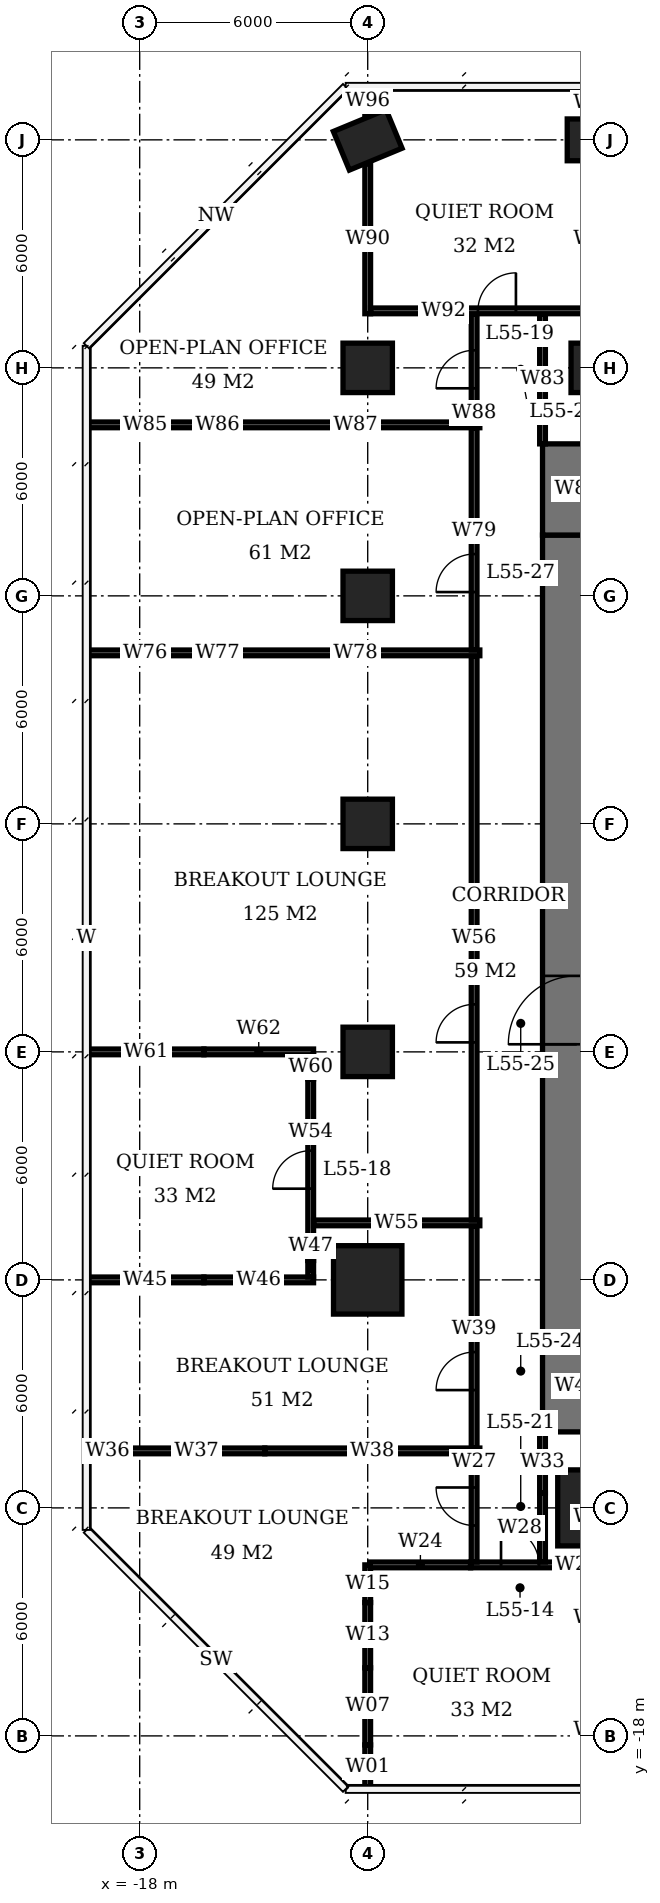
"""IFC4 building model, lengths in metres.
Left out: names, types, materials, properties, quantities, classifications, styles, units other than length and angle.
Written with IfcOpenShell. Run it as: python <this file> out.ifc"""

import sys

from ifc_helpers import new_model, si_unit, direction, frame, frame_2d, origin, origin_2d, place, context, subcontext, project, spatial, rectangle, extrude, element, fill, save


model = new_model("IFC4")
c1 = context("Model", 3, precision=1e-05, world=origin(), true_north=direction((0.0, 1.0)))
c2 = subcontext(c1, "Body", "Model", "MODEL_VIEW")
j1 = project(units=[si_unit("LENGTHUNIT", "METRE"), si_unit("PLANEANGLEUNIT", "RADIAN")], contexts=[c1])
p1 = place(None, origin())
s1 = spatial("IfcSite", under=j1, at=p1, CompositionType="ELEMENT")
p2 = place(p1, origin())
s2 = spatial("IfcBuilding", under=s1, at=p2, CompositionType="ELEMENT")
p3 = place(p2, frame((0.0, 0.0, 224.0)))
s3 = spatial("IfcBuildingStorey", under=s2, at=p3, CompositionType="ELEMENT", Elevation=224.0)
p4 = place(p3, frame((-12.0, -6.0, 0.0), z_axis=(0.0, 0.0, 1.0), x_axis=(1.0, 0.0, 0.0)))
e1 = element("IfcColumn", 1, at=p4, inside=s3, PredefinedType="COLUMN", context=c2, shape_type="SweptSolid", body=[
    extrude(rectangle(XDim=1.8, YDim=1.8, at=origin_2d()), origin(), (0.0, 0.0, 1.0), 3.9),
])
for number, where, z_axis, x_axis in (
    (2, (-12.0, 0.0, 0.0), (0.0, 0.0, 1.0), (1.0, 0.0, 0.0)),
    (3, (-12.0, 6.0, 0.0), (0.0, 0.0, 1.0), (1.0, 0.0, 0.0)),
    (4, (-12.0, 12.0, 0.0), (0.0, 0.0, 1.0), (1.0, 0.0, 0.0)),
    (5, (-12.0, 18.0, 0.0), (0.0, 0.0, 1.0), (1.0, 0.0, 0.0)),
):
    element("IfcColumn", number, at=place(p3, frame(where, z_axis=z_axis, x_axis=x_axis)), inside=s3, PredefinedType="COLUMN", context=c2, shape_type="SweptSolid", body=[
        extrude(rectangle(XDim=1.3, YDim=1.3, at=origin_2d()), origin(), (0.0, 0.0, 1.0), 3.9),
    ])
p5 = place(p3, frame((-12.0, 24.0, 0.0), z_axis=(0.0, 0.0, 1.0), x_axis=(0.923879532511, 0.382683432365, 0.0)))
e6 = element("IfcColumn", 6, at=p5, inside=s3, PredefinedType="COLUMN", context=c2, shape_type="SweptSolid", body=[
    extrude(rectangle(XDim=1.5, YDim=1.1, at=origin_2d()), origin(), (0.0, 0.0, 1.0), 3.9),
])
p6 = place(p3, frame((-6.0, -12.0, 0.0), z_axis=(0.0, 0.0, 1.0), x_axis=(1.0, 0.0, 0.0)))
e7 = element("IfcColumn", 7, at=p6, inside=s3, PredefinedType="COLUMN", context=c2, shape_type="SweptSolid", body=[
    extrude(rectangle(XDim=2.0, YDim=2.0, at=origin_2d()), origin(), (0.0, 0.0, 1.0), 3.9),
])
p7 = place(p3, frame((-6.0, 18.0, 0.0), z_axis=(0.0, 0.0, 1.0), x_axis=(1.0, 0.0, 0.0)))
e8 = element("IfcColumn", 8, at=p7, inside=s3, PredefinedType="COLUMN", context=c2, shape_type="SweptSolid", body=[
    extrude(rectangle(XDim=1.3, YDim=1.3, at=origin_2d()), origin(), (0.0, 0.0, 1.0), 3.9),
])
p8 = place(p3, frame((-6.0, 24.0, 0.0), z_axis=(0.0, 0.0, 1.0), x_axis=(1.0, 0.0, 0.0)))
e9 = element("IfcColumn", 9, at=p8, inside=s3, PredefinedType="COLUMN", context=c2, shape_type="SweptSolid", body=[
    extrude(rectangle(XDim=1.5, YDim=1.1, at=origin_2d()), origin(), (0.0, 0.0, 1.0), 3.9),
])
p9 = place(p3, frame((-6.5, -7.6, 0.0), z_axis=(0.0, 0.0, 1.0), x_axis=(0.0, 1.0, 0.0)))
e10 = element("IfcWall", 10, at=p9, inside=s3, PredefinedType="SHEAR", context=c2, shape_type="SweptSolid", body=[
    extrude(rectangle(XDim=21.2, YDim=1.8, at=frame_2d((10.6, 0.0))), origin(), (0.0, 0.0, 1.0), 3.9),
])
p10 = place(p9, frame((7.8, 0.0, 0.0)))
e11 = element("IfcOpeningElement", 11, at=p10, cuts=e10, PredefinedType="OPENING", context=c2, shape_type="SweptSolid", body=[
    extrude(rectangle(XDim=1.8, YDim=2.4, at=frame_2d((0.9, 1.2))), frame((0.0, 0.91, 0.0), z_axis=(0.0, -1.0, 0.0), x_axis=(1.0, 0.0, 0.0)), (0.0, 0.0, 1.0), 1.82),
])
for number, where, z_axis, x_axis in (
    (12, (-6.5, -10.0, 0.0), (0.0, 0.0, 1.0), (0.0, 1.0, 0.0)),
    (13, (-6.5, 13.6, 0.0), (0.0, 0.0, 1.0), (0.0, 1.0, 0.0)),
):
    element("IfcWall", number, at=place(p3, frame(where, z_axis=z_axis, x_axis=x_axis)), inside=s3, PredefinedType="SHEAR", context=c2, shape_type="SweptSolid", body=[
        extrude(rectangle(XDim=2.4, YDim=1.8, at=frame_2d((1.2, 0.0))), origin(), (0.0, 0.0, 1.0), 3.9),
    ])
p11 = place(p3, frame((-11.935, -13.5, 0.0), z_axis=(0.0, 0.0, 1.0), x_axis=(1.0, 0.0, 0.0)))
e14 = element("IfcWall", 14, at=p11, inside=s3, PredefinedType="PARTITIONING", context=c2, shape_type="SweptSolid", body=[
    extrude(rectangle(XDim=2.643, YDim=0.15, at=frame_2d((1.322, 0.0))), origin(), (0.0, 0.0, 1.0), 3.65),
])
p12 = place(p3, frame((-9.292, -13.5, 0.0), z_axis=(0.0, 0.0, 1.0), x_axis=(1.0, 0.0, 0.0)))
e15 = element("IfcWall", 15, at=p12, inside=s3, PredefinedType="PARTITIONING", context=c2, shape_type="SweptSolid", body=[
    extrude(rectangle(XDim=3.217, YDim=0.15, at=frame_2d((1.608, 0.0))), origin(), (0.0, 0.0, 1.0), 2.65),
])
p13 = place(p12, frame((0.8, 0.0, 0.0)))
e16 = element("IfcOpeningElement", 16, at=p13, cuts=e15, PredefinedType="OPENING", context=c2, shape_type="SweptSolid", body=[
    extrude(rectangle(XDim=1.0, YDim=2.1, at=frame_2d((0.5, 1.05))), frame((0.0, 0.085, 0.0), z_axis=(0.0, -1.0, 0.0), x_axis=(1.0, 0.0, 0.0)), (0.0, 0.0, 1.0), 0.17),
])
p14 = place(p3, frame((-19.4, -6.0, 0.0), z_axis=(0.0, 0.0, 1.0), x_axis=(1.0, 0.0, 0.0)))
e17 = element("IfcWall", 17, at=p14, inside=s3, PredefinedType="PARTITIONING", context=c2, shape_type="SweptSolid", body=[
    extrude(rectangle(XDim=3.09, YDim=0.15, at=frame_2d((1.545, 0.0))), origin(), (0.0, 0.0, 1.0), 3.65),
])
p15 = place(p3, frame((-16.31, -6.0, 0.0), z_axis=(0.0, 0.0, 1.0), x_axis=(1.0, 0.0, 0.0)))
e18 = element("IfcWall", 18, at=p15, inside=s3, PredefinedType="PARTITIONING", context=c2, shape_type="SweptSolid", body=[
    extrude(rectangle(XDim=2.885, YDim=0.15, at=frame_2d((1.442, 0.0))), origin(), (0.0, 0.0, 1.0), 2.65),
])
p16 = place(p3, frame((-19.35, 0.0, 0.0), z_axis=(0.0, 0.0, 1.0), x_axis=(1.0, 0.0, 0.0)))
e19 = element("IfcWall", 19, at=p16, inside=s3, PredefinedType="PARTITIONING", context=c2, shape_type="SweptSolid", body=[
    extrude(rectangle(XDim=3.04, YDim=0.15, at=frame_2d((1.52, 0.0))), origin(), (0.0, 0.0, 1.0), 3.65),
])
p17 = place(p3, frame((-16.31, 0.0, 0.0), z_axis=(0.0, 0.0, 1.0), x_axis=(1.0, 0.0, 0.0)))
e20 = element("IfcWall", 20, at=p17, inside=s3, PredefinedType="PARTITIONING", context=c2, shape_type="SweptSolid", body=[
    extrude(rectangle(XDim=2.885, YDim=0.15, at=frame_2d((1.442, 0.0))), origin(), (0.0, 0.0, 1.0), 2.65),
])
p18 = place(p3, frame((-11.925, 19.5, 0.0), z_axis=(0.0, 0.0, 1.0), x_axis=(1.0, 0.0, 0.0)))
e21 = element("IfcWall", 21, at=p18, inside=s3, PredefinedType="PARTITIONING", context=c2, shape_type="SweptSolid", body=[
    extrude(rectangle(XDim=5.85, YDim=0.15, at=frame_2d((2.925, 0.0))), origin(), (0.0, 0.0, 1.0), 3.65),
])
p19 = place(p18, frame((2.825, 0.0, 0.0)))
e22 = element("IfcOpeningElement", 22, at=p19, cuts=e21, PredefinedType="OPENING", context=c2, shape_type="SweptSolid", body=[
    extrude(rectangle(XDim=1.0, YDim=2.1, at=frame_2d((0.5, 1.05))), frame((0.0, 0.085, 0.0), z_axis=(0.0, -1.0, 0.0), x_axis=(1.0, 0.0, 0.0)), (0.0, 0.0, 1.0), 0.17),
])
p20 = place(p3, frame((-13.5, -5.925, 0.0), z_axis=(0.0, 0.0, 1.0), x_axis=(0.0, 1.0, 0.0)))
e23 = element("IfcWall", 23, at=p20, inside=s3, PredefinedType="PARTITIONING", context=c2, shape_type="SweptSolid", body=[
    extrude(rectangle(XDim=0.435, YDim=0.15, at=frame_2d((0.218, 0.0))), origin(), (0.0, 0.0, 1.0), 2.65),
])
p21 = place(p3, frame((-13.5, -5.49, 0.0), z_axis=(0.0, 0.0, 1.0), x_axis=(0.0, 1.0, 0.0)))
e24 = element("IfcWall", 24, at=p21, inside=s3, PredefinedType="PARTITIONING", context=c2, shape_type="SweptSolid", body=[
    extrude(rectangle(XDim=4.78, YDim=0.15, at=frame_2d((2.39, 0.0))), origin(), (0.0, 0.0, 1.0), 3.65),
])
p22 = place(p21, frame((1.89, 0.0, 0.0)))
e25 = element("IfcOpeningElement", 25, at=p22, cuts=e24, PredefinedType="OPENING", context=c2, shape_type="SweptSolid", body=[
    extrude(rectangle(XDim=1.0, YDim=2.1, at=frame_2d((0.5, 1.05))), frame((0.0, 0.085, 0.0), z_axis=(0.0, -1.0, 0.0), x_axis=(1.0, 0.0, 0.0)), (0.0, 0.0, 1.0), 0.17),
])
p23 = place(p3, frame((-13.5, -0.71, 0.0), z_axis=(0.0, 0.0, 1.0), x_axis=(0.0, 1.0, 0.0)))
e26 = element("IfcWall", 26, at=p23, inside=s3, PredefinedType="PARTITIONING", context=c2, shape_type="SweptSolid", body=[
    extrude(rectangle(XDim=0.635, YDim=0.15, at=frame_2d((0.317, 0.0))), origin(), (0.0, 0.0, 1.0), 2.65),
])
p24 = place(p3, frame((-12.0, -19.4, 0.0), z_axis=(0.0, 0.0, 1.0), x_axis=(0.0, 1.0, 0.0)))
e27 = element("IfcWall", 27, at=p24, inside=s3, PredefinedType="PARTITIONING", context=c2, shape_type="SweptSolid", body=[
    extrude(rectangle(XDim=1.163, YDim=0.15, at=frame_2d((0.582, 0.0))), origin(), (0.0, 0.0, 1.0), 3.65),
])
p25 = place(p3, frame((-12.0, -18.237, 0.0), z_axis=(0.0, 0.0, 1.0), x_axis=(0.0, 1.0, 0.0)))
e28 = element("IfcWall", 28, at=p25, inside=s3, PredefinedType="PARTITIONING", context=c2, shape_type="SweptSolid", body=[
    extrude(rectangle(XDim=2.029, YDim=0.15, at=frame_2d((1.015, 0.0))), origin(), (0.0, 0.0, 1.0), 2.65),
])
p26 = place(p3, frame((-12.0, -16.208, 0.0), z_axis=(0.0, 0.0, 1.0), x_axis=(0.0, 1.0, 0.0)))
e29 = element("IfcWall", 29, at=p26, inside=s3, PredefinedType="PARTITIONING", context=c2, shape_type="SweptSolid", body=[
    extrude(rectangle(XDim=1.718, YDim=0.15, at=frame_2d((0.859, 0.0))), origin(), (0.0, 0.0, 1.0), 3.65),
])
p27 = place(p3, frame((-12.0, -14.49, 0.0), z_axis=(0.0, 0.0, 1.0), x_axis=(0.0, 1.0, 0.0)))
e30 = element("IfcWall", 30, at=p27, inside=s3, PredefinedType="PARTITIONING", context=c2, shape_type="SweptSolid", body=[
    extrude(rectangle(XDim=0.99, YDim=0.15, at=frame_2d((0.495, 0.0))), origin(), (0.0, 0.0, 1.0), 2.65),
])
p28 = place(p3, frame((-12.0, 19.425, 0.0), z_axis=(0.0, 0.0, 1.0), x_axis=(0.0, 1.0, 0.0)))
e31 = element("IfcWall", 31, at=p28, inside=s3, PredefinedType="PARTITIONING", context=c2, shape_type="SweptSolid", body=[
    extrude(rectangle(XDim=3.948, YDim=0.15, at=frame_2d((1.974, 0.0))), origin(), (0.0, 0.0, 1.0), 3.65),
])
p29 = place(p3, frame((-12.0, 24.626, 0.0), z_axis=(0.0, 0.0, 1.0), x_axis=(0.0, 1.0, 0.0)))
e32 = element("IfcWall", 32, at=p29, inside=s3, PredefinedType="PARTITIONING", context=c2, shape_type="SweptSolid", body=[
    extrude(rectangle(XDim=0.773, YDim=0.15, at=frame_2d((0.387, 0.0))), origin(), (0.0, 0.0, 1.0), 3.65),
])
p30 = place(p3, frame((-19.4, -10.5, 0.0), z_axis=(0.0, 0.0, 1.0), x_axis=(1.0, 0.0, 0.0)))
e33 = element("IfcWall", 33, at=p30, inside=s3, PredefinedType="PARTITIONING", context=c2, shape_type="SweptSolid", body=[
    extrude(rectangle(XDim=1.108, YDim=0.15, at=frame_2d((0.554, 0.0))), origin(), (0.0, 0.0, 1.0), 3.65),
])
p31 = place(p3, frame((-18.292, -10.5, 0.0), z_axis=(0.0, 0.0, 1.0), x_axis=(1.0, 0.0, 0.0)))
e34 = element("IfcWall", 34, at=p31, inside=s3, PredefinedType="PARTITIONING", context=c2, shape_type="SweptSolid", body=[
    extrude(rectangle(XDim=3.584, YDim=0.15, at=frame_2d((1.792, 0.0))), origin(), (0.0, 0.0, 1.0), 2.65),
])
p32 = place(p3, frame((-14.708, -10.5, 0.0), z_axis=(0.0, 0.0, 1.0), x_axis=(1.0, 0.0, 0.0)))
e35 = element("IfcWall", 35, at=p32, inside=s3, PredefinedType="PARTITIONING", context=c2, shape_type="SweptSolid", body=[
    extrude(rectangle(XDim=5.658, YDim=0.15, at=frame_2d((2.829, 0.0))), origin(), (0.0, 0.0, 1.0), 3.65),
])
p33 = place(p3, frame((-19.4, 10.5, 0.0), z_axis=(0.0, 0.0, 1.0), x_axis=(1.0, 0.0, 0.0)))
e36 = element("IfcWall", 36, at=p33, inside=s3, PredefinedType="PARTITIONING", context=c2, shape_type="SweptSolid", body=[
    extrude(rectangle(XDim=3.09, YDim=0.15, at=frame_2d((1.545, 0.0))), origin(), (0.0, 0.0, 1.0), 3.65),
])
p34 = place(p3, frame((-16.31, 10.5, 0.0), z_axis=(0.0, 0.0, 1.0), x_axis=(1.0, 0.0, 0.0)))
e37 = element("IfcWall", 37, at=p34, inside=s3, PredefinedType="PARTITIONING", context=c2, shape_type="SweptSolid", body=[
    extrude(rectangle(XDim=0.72, YDim=0.15, at=frame_2d((0.36, 0.0))), origin(), (0.0, 0.0, 1.0), 2.65),
])
p35 = place(p3, frame((-15.59, 10.5, 0.0), z_axis=(0.0, 0.0, 1.0), x_axis=(1.0, 0.0, 0.0)))
e38 = element("IfcWall", 38, at=p35, inside=s3, PredefinedType="PARTITIONING", context=c2, shape_type="SweptSolid", body=[
    extrude(rectangle(XDim=6.54, YDim=0.15, at=frame_2d((3.27, 0.0))), origin(), (0.0, 0.0, 1.0), 3.65),
])
p36 = place(p3, frame((-19.4, 16.5, 0.0), z_axis=(0.0, 0.0, 1.0), x_axis=(1.0, 0.0, 0.0)))
e39 = element("IfcWall", 39, at=p36, inside=s3, PredefinedType="PARTITIONING", context=c2, shape_type="SweptSolid", body=[
    extrude(rectangle(XDim=3.09, YDim=0.15, at=frame_2d((1.545, 0.0))), origin(), (0.0, 0.0, 1.0), 3.65),
])
p37 = place(p3, frame((-16.31, 16.5, 0.0), z_axis=(0.0, 0.0, 1.0), x_axis=(1.0, 0.0, 0.0)))
e40 = element("IfcWall", 40, at=p37, inside=s3, PredefinedType="PARTITIONING", context=c2, shape_type="SweptSolid", body=[
    extrude(rectangle(XDim=0.72, YDim=0.15, at=frame_2d((0.36, 0.0))), origin(), (0.0, 0.0, 1.0), 2.65),
])
p38 = place(p3, frame((-15.59, 16.5, 0.0), z_axis=(0.0, 0.0, 1.0), x_axis=(1.0, 0.0, 0.0)))
e41 = element("IfcWall", 41, at=p38, inside=s3, PredefinedType="PARTITIONING", context=c2, shape_type="SweptSolid", body=[
    extrude(rectangle(XDim=6.54, YDim=0.15, at=frame_2d((3.27, 0.0))), origin(), (0.0, 0.0, 1.0), 3.65),
])
p39 = place(p3, frame((-13.425, -4.5, 0.0), z_axis=(0.0, 0.0, 1.0), x_axis=(1.0, 0.0, 0.0)))
e42 = element("IfcWall", 42, at=p39, inside=s3, PredefinedType="PARTITIONING", context=c2, shape_type="SweptSolid", body=[
    extrude(rectangle(XDim=4.375, YDim=0.15, at=frame_2d((2.188, 0.0))), origin(), (0.0, 0.0, 1.0), 3.65),
])
p40 = place(p3, frame((-9.2, -13.425, 0.0), z_axis=(0.0, 0.0, 1.0), x_axis=(0.0, 1.0, 0.0)))
e43 = element("IfcWall", 43, at=p40, inside=s3, PredefinedType="PARTITIONING", context=c2, shape_type="SweptSolid", body=[
    extrude(rectangle(XDim=2.85, YDim=0.15, at=frame_2d((1.425, 0.0))), origin(), (0.0, 0.0, 1.0), 3.65),
])
p41 = place(p40, frame((0.962, 0.0, 0.0)))
e44 = element("IfcOpeningElement", 44, at=p41, cuts=e43, PredefinedType="OPENING", context=c2, shape_type="SweptSolid", body=[
    extrude(rectangle(XDim=1.0, YDim=2.1, at=frame_2d((0.5, 1.05))), frame((0.0, 0.085, 0.0), z_axis=(0.0, -1.0, 0.0), x_axis=(1.0, 0.0, 0.0)), (0.0, 0.0, 1.0), 0.17),
])
p42 = place(p3, frame((-9.2, -10.425, 0.0), z_axis=(0.0, 0.0, 1.0), x_axis=(0.0, 1.0, 0.0)))
e45 = element("IfcWall", 45, at=p42, inside=s3, PredefinedType="PARTITIONING", context=c2, shape_type="SweptSolid", body=[
    extrude(rectangle(XDim=5.85, YDim=0.15, at=frame_2d((2.925, 0.0))), origin(), (0.0, 0.0, 1.0), 3.65),
])
p43 = place(p42, frame((1.525, 0.0, 0.0)))
e46 = element("IfcOpeningElement", 46, at=p43, cuts=e45, PredefinedType="OPENING", context=c2, shape_type="SweptSolid", body=[
    extrude(rectangle(XDim=1.0, YDim=2.1, at=frame_2d((0.5, 1.05))), frame((0.0, 0.085, 0.0), z_axis=(0.0, -1.0, 0.0), x_axis=(1.0, 0.0, 0.0)), (0.0, 0.0, 1.0), 0.17),
])
p44 = place(p3, frame((-9.2, -4.425, 0.0), z_axis=(0.0, 0.0, 1.0), x_axis=(0.0, 1.0, 0.0)))
e47 = element("IfcWall", 47, at=p44, inside=s3, PredefinedType="PARTITIONING", context=c2, shape_type="SweptSolid", body=[
    extrude(rectangle(XDim=14.85, YDim=0.15, at=frame_2d((7.425, 0.0))), origin(), (0.0, 0.0, 1.0), 3.65),
])
p45 = place(p44, frame((4.675, 0.0, 0.0)))
e48 = element("IfcOpeningElement", 48, at=p45, cuts=e47, PredefinedType="OPENING", context=c2, shape_type="SweptSolid", body=[
    extrude(rectangle(XDim=1.0, YDim=2.1, at=frame_2d((0.5, 1.05))), frame((0.0, 0.085, 0.0), z_axis=(0.0, -1.0, 0.0), x_axis=(1.0, 0.0, 0.0)), (0.0, 0.0, 1.0), 0.17),
])
p46 = place(p3, frame((-9.2, 10.575, 0.0), z_axis=(0.0, 0.0, 1.0), x_axis=(0.0, 1.0, 0.0)))
e49 = element("IfcWall", 49, at=p46, inside=s3, PredefinedType="PARTITIONING", context=c2, shape_type="SweptSolid", body=[
    extrude(rectangle(XDim=5.85, YDim=0.15, at=frame_2d((2.925, 0.0))), origin(), (0.0, 0.0, 1.0), 3.65),
])
p47 = place(p46, frame((1.525, 0.0, 0.0)))
e50 = element("IfcOpeningElement", 50, at=p47, cuts=e49, PredefinedType="OPENING", context=c2, shape_type="SweptSolid", body=[
    extrude(rectangle(XDim=1.0, YDim=2.1, at=frame_2d((0.5, 1.05))), frame((0.0, 0.085, 0.0), z_axis=(0.0, -1.0, 0.0), x_axis=(1.0, 0.0, 0.0)), (0.0, 0.0, 1.0), 0.17),
])
p48 = place(p3, frame((-9.2, 16.575, 0.0), z_axis=(0.0, 0.0, 1.0), x_axis=(0.0, 1.0, 0.0)))
e51 = element("IfcWall", 51, at=p48, inside=s3, PredefinedType="PARTITIONING", context=c2, shape_type="SweptSolid", body=[
    extrude(rectangle(XDim=2.85, YDim=0.15, at=frame_2d((1.425, 0.0))), origin(), (0.0, 0.0, 1.0), 3.65),
])
p49 = place(p48, frame((0.887, 0.0, 0.0)))
e52 = element("IfcOpeningElement", 52, at=p49, cuts=e51, PredefinedType="OPENING", context=c2, shape_type="SweptSolid", body=[
    extrude(rectangle(XDim=1.0, YDim=2.1, at=frame_2d((0.5, 1.05))), frame((0.0, 0.085, 0.0), z_axis=(0.0, -1.0, 0.0), x_axis=(1.0, 0.0, 0.0)), (0.0, 0.0, 1.0), 0.17),
])
p50 = place(p3, frame((-7.4, -13.425, 0.0), z_axis=(0.0, 0.0, 1.0), x_axis=(0.0, 1.0, 0.0)))
e53 = element("IfcWall", 53, at=p50, inside=s3, PredefinedType="PARTITIONING", context=c2, shape_type="SweptSolid", body=[
    extrude(rectangle(XDim=1.817, YDim=0.15, at=frame_2d((0.909, 0.0))), origin(), (0.0, 0.0, 1.0), 2.65),
])
p51 = place(p3, frame((-7.4, -11.608, 0.0), z_axis=(0.0, 0.0, 1.0), x_axis=(0.0, 1.0, 0.0)))
e54 = element("IfcWall", 54, at=p51, inside=s3, PredefinedType="PARTITIONING", context=c2, shape_type="SweptSolid", body=[
    extrude(rectangle(XDim=1.608, YDim=0.15, at=frame_2d((0.804, 0.0))), origin(), (0.0, 0.0, 1.0), 3.65),
])
p52 = place(p3, frame((-7.4, 16.0, 0.0), z_axis=(0.0, 0.0, 1.0), x_axis=(0.0, 1.0, 0.0)))
e55 = element("IfcWall", 55, at=p52, inside=s3, PredefinedType="PARTITIONING", context=c2, shape_type="SweptSolid", body=[
    extrude(rectangle(XDim=3.425, YDim=0.15, at=frame_2d((1.712, 0.0))), origin(), (0.0, 0.0, 1.0), 3.65),
])
p53 = place(p10, origin())
e56 = element("IfcDoor", 56, at=p53, inside=s3, OperationType="DOUBLE_DOOR_SINGLE_SWING", PredefinedType="DOOR", context=c2, shape_type="SweptSolid", body=[
    extrude(rectangle(XDim=1.8, YDim=2.4, at=frame_2d((0.9, 1.2))), frame((0.0, 0.025, 0.0), z_axis=(0.0, -1.0, 0.0), x_axis=(1.0, 0.0, 0.0)), (0.0, 0.0, 1.0), 0.05),
])
fill(e11, e56)
p54 = place(p13, origin())
e57 = element("IfcDoor", 57, at=p54, inside=s3, OperationType="SINGLE_SWING_LEFT", PredefinedType="DOOR", context=c2, shape_type="SweptSolid", body=[
    extrude(rectangle(XDim=1.0, YDim=2.1, at=frame_2d((0.5, 1.05))), frame((0.0, 0.025, 0.0), z_axis=(0.0, -1.0, 0.0), x_axis=(1.0, 0.0, 0.0)), (0.0, 0.0, 1.0), 0.05),
])
fill(e16, e57)
p55 = place(p22, origin())
e58 = element("IfcDoor", 58, at=p55, inside=s3, OperationType="SINGLE_SWING_LEFT", PredefinedType="DOOR", context=c2, shape_type="SweptSolid", body=[
    extrude(rectangle(XDim=1.0, YDim=2.1, at=frame_2d((0.5, 1.05))), frame((0.0, 0.025, 0.0), z_axis=(0.0, -1.0, 0.0), x_axis=(1.0, 0.0, 0.0)), (0.0, 0.0, 1.0), 0.05),
])
fill(e25, e58)
p56 = place(p19, origin())
e59 = element("IfcDoor", 59, at=p56, inside=s3, OperationType="SINGLE_SWING_RIGHT", PredefinedType="DOOR", context=c2, shape_type="SweptSolid", body=[
    extrude(rectangle(XDim=1.0, YDim=2.1, at=frame_2d((0.5, 1.05))), frame((0.0, 0.025, 0.0), z_axis=(0.0, -1.0, 0.0), x_axis=(1.0, 0.0, 0.0)), (0.0, 0.0, 1.0), 0.05),
])
fill(e22, e59)
p57 = place(p41, origin())
e60 = element("IfcDoor", 60, at=p57, inside=s3, OperationType="SINGLE_SWING_RIGHT", PredefinedType="DOOR", context=c2, shape_type="SweptSolid", body=[
    extrude(rectangle(XDim=1.0, YDim=2.1, at=frame_2d((0.5, 1.05))), frame((0.0, 0.025, 0.0), z_axis=(0.0, -1.0, 0.0), x_axis=(1.0, 0.0, 0.0)), (0.0, 0.0, 1.0), 0.05),
])
fill(e44, e60)
p58 = place(p43, origin())
e61 = element("IfcDoor", 61, at=p58, inside=s3, OperationType="SINGLE_SWING_LEFT", PredefinedType="DOOR", context=c2, shape_type="SweptSolid", body=[
    extrude(rectangle(XDim=1.0, YDim=2.1, at=frame_2d((0.5, 1.05))), frame((0.0, 0.025, 0.0), z_axis=(0.0, -1.0, 0.0), x_axis=(1.0, 0.0, 0.0)), (0.0, 0.0, 1.0), 0.05),
])
fill(e46, e61)
p59 = place(p45, origin())
e62 = element("IfcDoor", 62, at=p59, inside=s3, OperationType="SINGLE_SWING_LEFT", PredefinedType="DOOR", context=c2, shape_type="SweptSolid", body=[
    extrude(rectangle(XDim=1.0, YDim=2.1, at=frame_2d((0.5, 1.05))), frame((0.0, 0.025, 0.0), z_axis=(0.0, -1.0, 0.0), x_axis=(1.0, 0.0, 0.0)), (0.0, 0.0, 1.0), 0.05),
])
fill(e48, e62)
p60 = place(p47, origin())
e63 = element("IfcDoor", 63, at=p60, inside=s3, OperationType="SINGLE_SWING_LEFT", PredefinedType="DOOR", context=c2, shape_type="SweptSolid", body=[
    extrude(rectangle(XDim=1.0, YDim=2.1, at=frame_2d((0.5, 1.05))), frame((0.0, 0.025, 0.0), z_axis=(0.0, -1.0, 0.0), x_axis=(1.0, 0.0, 0.0)), (0.0, 0.0, 1.0), 0.05),
])
fill(e50, e63)
p61 = place(p49, origin())
e64 = element("IfcDoor", 64, at=p61, inside=s3, OperationType="SINGLE_SWING_LEFT", PredefinedType="DOOR", context=c2, shape_type="SweptSolid", body=[
    extrude(rectangle(XDim=1.0, YDim=2.1, at=frame_2d((0.5, 1.05))), frame((0.0, 0.025, 0.0), z_axis=(0.0, -1.0, 0.0), x_axis=(1.0, 0.0, 0.0)), (0.0, 0.0, 1.0), 0.05),
])
fill(e52, e64)
save(model, sys.argv[1])
